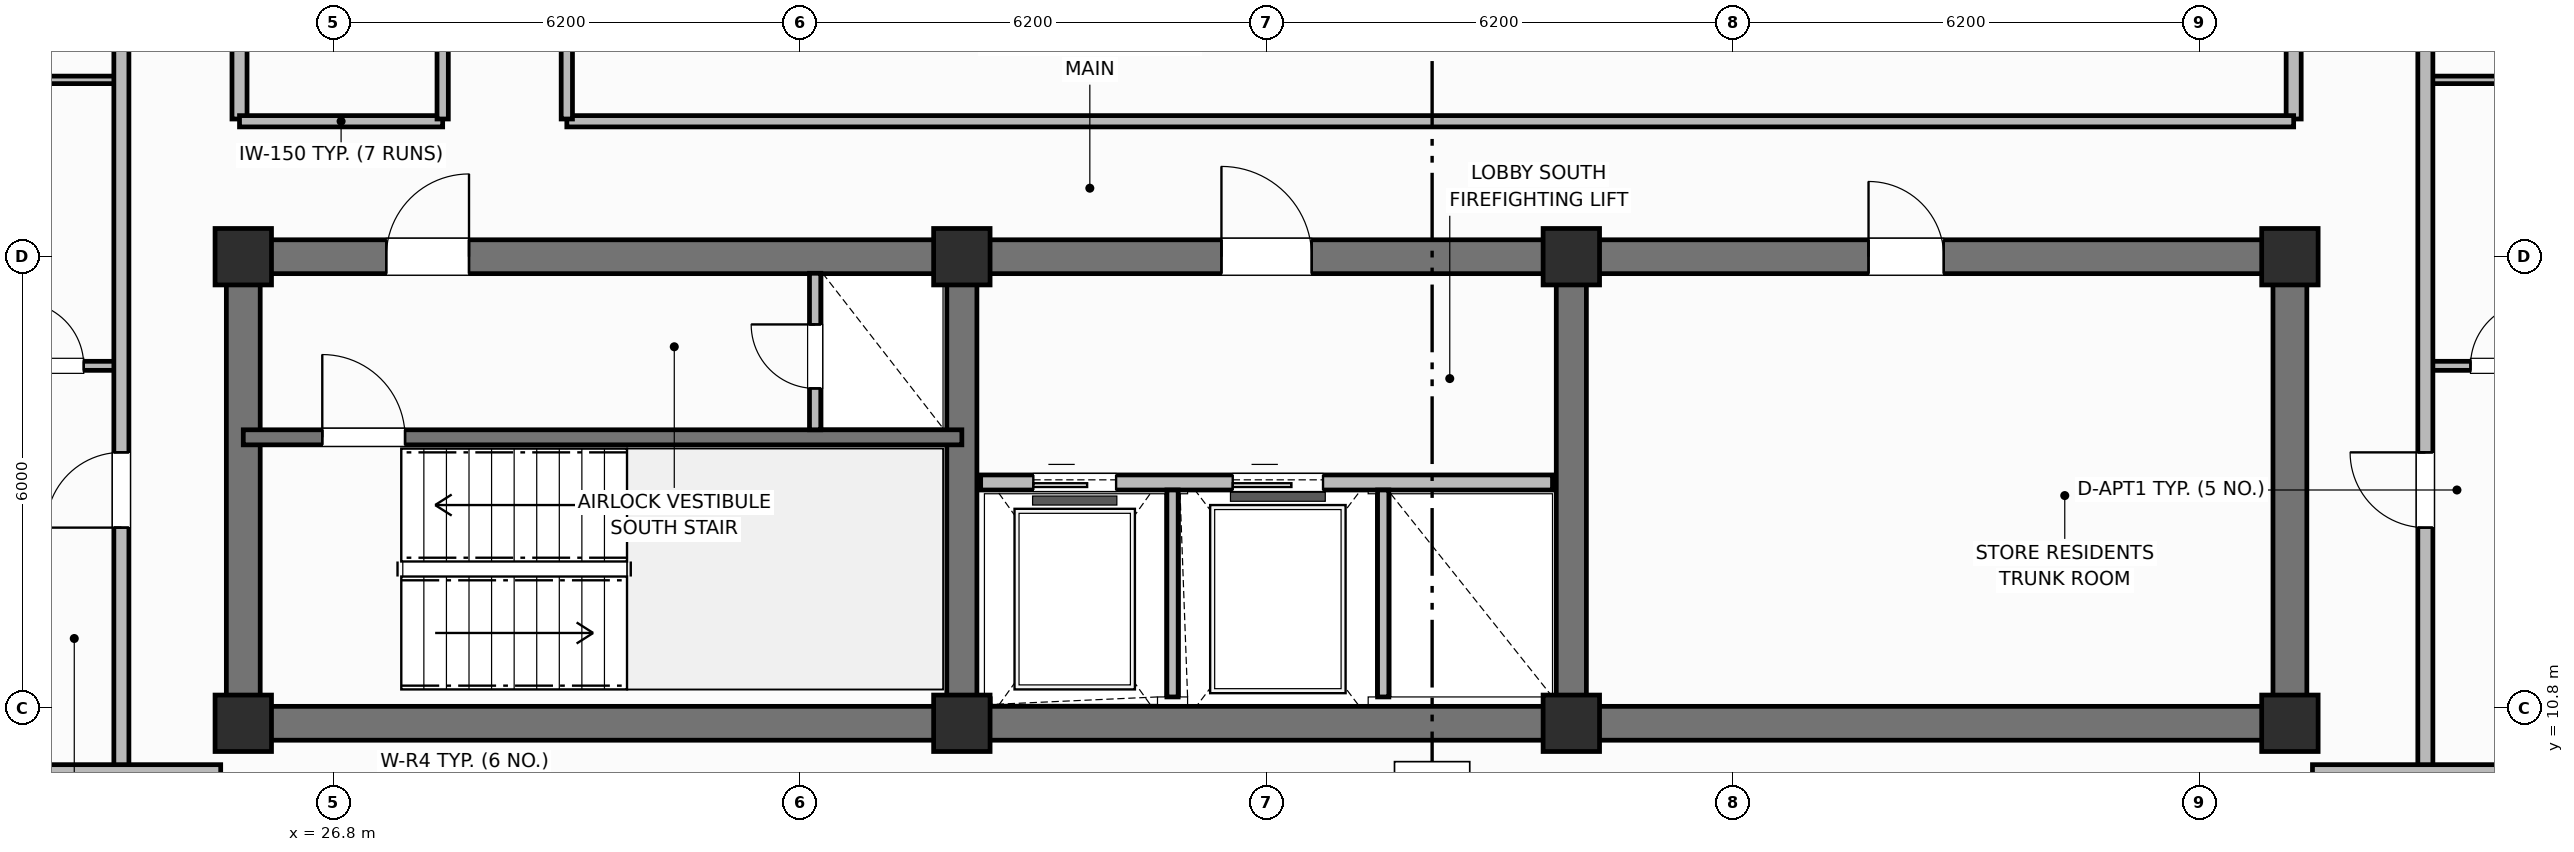
"""IFC4 building model, lengths in metres.
Left out: names, types, materials, properties, quantities, classifications, styles, units other than length and angle.
Written with IfcOpenShell. Run it as: python <this file> out.ifc"""

import sys

from ifc_helpers import new_model, si_unit, direction, frame, frame_2d, origin, origin_2d, place, context, subcontext, project, spatial, rectangle, extrude, element, fill, save


model = new_model("IFC4")
c1 = context("Model", 3, precision=1e-05, world=origin(), true_north=direction((0.0, 1.0)))
c2 = subcontext(c1, "Body", "Model", "MODEL_VIEW")
j1 = project(units=[si_unit("LENGTHUNIT", "METRE"), si_unit("PLANEANGLEUNIT", "RADIAN")], contexts=[c1])
p1 = place(None, origin())
s1 = spatial("IfcSite", under=j1, at=p1, CompositionType="ELEMENT")
p2 = place(p1, origin())
s2 = spatial("IfcBuilding", under=s1, at=p2, CompositionType="ELEMENT")
p3 = place(p2, frame((0.0, 0.0, 282.4)))
s3 = spatial("IfcBuildingStorey", under=s2, at=p3, CompositionType="ELEMENT", Elevation=282.4)
p4 = place(p3, frame((52.8, 10.6, 0.0), z_axis=(0.0, 0.0, 1.0), x_axis=(-1.0, 0.0, 0.0)))
e1 = element("IfcWall", 1, at=p4, inside=s3, PredefinedType="SHEAR", context=c2, shape_type="SweptSolid", body=[
    extrude(rectangle(XDim=27.2, YDim=0.45, at=frame_2d((13.6, 0.0))), origin(), (0.0, 0.0, 1.0), 3.7),
])
for number, where, z_axis, x_axis in (
    (2, (25.6, 10.825, 0.0), (0.0, 0.0, 1.0), (0.0, 1.0, 0.0)),
    (3, (52.8, 10.825, 0.0), (0.0, 0.0, 1.0), (0.0, 1.0, 0.0)),
):
    element("IfcWall", number, at=place(p3, frame(where, z_axis=z_axis, x_axis=x_axis)), inside=s3, PredefinedType="SHEAR", context=c2, shape_type="SweptSolid", body=[
        extrude(rectangle(XDim=5.75, YDim=0.45, at=frame_2d((2.875, 0.0))), origin(), (0.0, 0.0, 1.0), 3.7),
    ])
p5 = place(p3, frame((25.6, 16.8, 0.0), z_axis=(0.0, 0.0, 1.0), x_axis=(1.0, 0.0, 0.0)))
e4 = element("IfcWall", 4, at=p5, inside=s3, PredefinedType="SHEAR", context=c2, shape_type="SweptSolid", body=[
    extrude(rectangle(XDim=27.2, YDim=0.45, at=frame_2d((13.6, 0.0))), origin(), (0.0, 0.0, 1.0), 3.7),
])
p6 = place(p5, frame((1.9, 0.0, 0.0)))
e5 = element("IfcOpeningElement", 5, at=p6, cuts=e4, PredefinedType="OPENING", context=c2, shape_type="SweptSolid", body=[
    extrude(rectangle(XDim=1.1, YDim=2.15, at=frame_2d((0.55, 1.075))), frame((0.0, 0.235, 0.0), z_axis=(0.0, -1.0, 0.0), x_axis=(1.0, 0.0, 0.0)), (0.0, 0.0, 1.0), 0.47),
])
p7 = place(p5, frame((13.0, 0.0, 0.0)))
e6 = element("IfcOpeningElement", 6, at=p7, cuts=e4, PredefinedType="OPENING", context=c2, shape_type="SweptSolid", body=[
    extrude(rectangle(XDim=1.2, YDim=2.15, at=frame_2d((0.6, 1.075))), frame((0.0, 0.235, 0.0), z_axis=(0.0, -1.0, 0.0), x_axis=(1.0, 0.0, 0.0)), (0.0, 0.0, 1.0), 0.47),
])
p8 = place(p5, frame((21.6, 0.0, 0.0)))
e7 = element("IfcOpeningElement", 7, at=p8, cuts=e4, PredefinedType="OPENING", context=c2, shape_type="SweptSolid", body=[
    extrude(rectangle(XDim=1.0, YDim=2.15, at=frame_2d((0.5, 1.075))), frame((0.0, 0.235, 0.0), z_axis=(0.0, -1.0, 0.0), x_axis=(1.0, 0.0, 0.0)), (0.0, 0.0, 1.0), 0.47),
])
for number, where, z_axis, x_axis in (
    (8, (35.15, 10.825, 0.0), (0.0, 0.0, 1.0), (0.0, 1.0, 0.0)),
    (9, (43.25, 10.825, 0.0), (0.0, 0.0, 1.0), (0.0, 1.0, 0.0)),
):
    element("IfcWall", number, at=place(p3, frame(where, z_axis=z_axis, x_axis=x_axis)), inside=s3, PredefinedType="SHEAR", context=c2, shape_type="SweptSolid", body=[
        extrude(rectangle(XDim=5.75, YDim=0.4, at=frame_2d((2.875, 0.0))), origin(), (0.0, 0.0, 1.0), 3.7),
    ])
for number, where, z_axis, x_axis in (
    (10, (25.6, 10.6, 0.0), (0.0, 0.0, 1.0), (1.0, 0.0, 0.0)),
    (11, (25.6, 16.8, 0.0), (0.0, 0.0, 1.0), (1.0, 0.0, 0.0)),
    (12, (35.15, 10.6, 0.0), (0.0, 0.0, 1.0), (1.0, 0.0, 0.0)),
    (13, (35.15, 16.8, 0.0), (0.0, 0.0, 1.0), (1.0, 0.0, 0.0)),
    (14, (43.25, 10.6, 0.0), (0.0, 0.0, 1.0), (1.0, 0.0, 0.0)),
    (15, (43.25, 16.8, 0.0), (0.0, 0.0, 1.0), (1.0, 0.0, 0.0)),
    (16, (52.8, 10.6, 0.0), (0.0, 0.0, 1.0), (1.0, 0.0, 0.0)),
    (17, (52.8, 16.8, 0.0), (0.0, 0.0, 1.0), (1.0, 0.0, 0.0)),
):
    element("IfcColumn", number, at=place(p3, frame(where, z_axis=z_axis, x_axis=x_axis)), inside=s3, PredefinedType="COLUMN", context=c2, shape_type="SweptSolid", body=[
        extrude(rectangle(XDim=0.75, YDim=0.75, at=origin_2d()), origin(), (0.0, 0.0, 1.0), 3.7),
    ])
p9 = place(p3, frame((25.6, 14.4, 0.0), z_axis=(0.0, 0.0, 1.0), x_axis=(1.0, 0.0, 0.0)))
e18 = element("IfcWall", 18, at=p9, inside=s3, PredefinedType="SHEAR", context=c2, shape_type="SweptSolid", body=[
    extrude(rectangle(XDim=9.55, YDim=0.2, at=frame_2d((4.775, 0.0))), origin(), (0.0, 0.0, 1.0), 3.7),
])
p10 = place(p9, frame((1.05, 0.0, 0.0)))
e19 = element("IfcOpeningElement", 19, at=p10, cuts=e18, PredefinedType="OPENING", context=c2, shape_type="SweptSolid", body=[
    extrude(rectangle(XDim=1.1, YDim=2.15, at=frame_2d((0.55, 1.075))), frame((0.0, 0.11, 0.0), z_axis=(0.0, -1.0, 0.0), x_axis=(1.0, 0.0, 0.0)), (0.0, 0.0, 1.0), 0.22),
])
p11 = place(p3, frame((33.2, 14.5, 0.0), z_axis=(0.0, 0.0, 1.0), x_axis=(0.0, 1.0, 0.0)))
e20 = element("IfcWall", 20, at=p11, inside=s3, PredefinedType="PARTITIONING", context=c2, shape_type="SweptSolid", body=[
    extrude(rectangle(XDim=2.08, YDim=0.15, at=frame_2d((1.04, 0.0))), origin(), (0.0, 0.0, 1.0), 2.56),
])
p12 = place(p11, frame((0.55, 0.0, 0.0)))
e21 = element("IfcOpeningElement", 21, at=p12, cuts=e20, PredefinedType="OPENING", context=c2, shape_type="SweptSolid", body=[
    extrude(rectangle(XDim=0.85, YDim=2.05, at=frame_2d((0.425, 1.025))), frame((0.0, 0.085, 0.0), z_axis=(0.0, -1.0, 0.0), x_axis=(1.0, 0.0, 0.0)), (0.0, 0.0, 1.0), 0.17),
])
p13 = place(p3, frame((35.4, 13.8, 0.0), z_axis=(0.0, 0.0, 1.0), x_axis=(1.0, 0.0, 0.0)))
e22 = element("IfcWall", 22, at=p13, inside=s3, PredefinedType="PARTITIONING", context=c2, shape_type="SweptSolid", body=[
    extrude(rectangle(XDim=7.6, YDim=0.2, at=frame_2d((3.8, 0.0))), origin(), (0.0, 0.0, 1.0), 2.33),
])
p14 = place(p13, frame((0.7, 0.0, 0.0)))
e23 = element("IfcOpeningElement", 23, at=p14, cuts=e22, PredefinedType="OPENING", context=c2, shape_type="SweptSolid", body=[
    extrude(rectangle(XDim=1.1, YDim=2.15, at=frame_2d((0.55, 1.075))), frame((0.0, 0.11, 0.0), z_axis=(0.0, -1.0, 0.0), x_axis=(1.0, 0.0, 0.0)), (0.0, 0.0, 1.0), 0.22),
])
p15 = place(p13, frame((3.35, 0.0, 0.0)))
e24 = element("IfcOpeningElement", 24, at=p15, cuts=e22, PredefinedType="OPENING", context=c2, shape_type="SweptSolid", body=[
    extrude(rectangle(XDim=1.2, YDim=2.15, at=frame_2d((0.6, 1.075))), frame((0.0, 0.11, 0.0), z_axis=(0.0, -1.0, 0.0), x_axis=(1.0, 0.0, 0.0)), (0.0, 0.0, 1.0), 0.22),
])
for number, where, z_axis, x_axis in (
    (25, (37.95, 10.95, 0.0), (0.0, 0.0, 1.0), (0.0, 1.0, 0.0)),
    (26, (40.75, 10.95, 0.0), (0.0, 0.0, 1.0), (0.0, 1.0, 0.0)),
):
    element("IfcWall", number, at=place(p3, frame(where, z_axis=z_axis, x_axis=x_axis)), inside=s3, PredefinedType="PARTITIONING", context=c2, shape_type="SweptSolid", body=[
        extrude(rectangle(XDim=2.75, YDim=0.15, at=frame_2d((1.375, 0.0))), origin(), (0.0, 0.0, 1.0), 2.56),
    ])
for number, where, z_axis, x_axis in (
    (27, (25.55, 18.63, 0.0), (0.0, 0.0, 1.0), (0.0, 1.0, 0.0)),
    (28, (52.85, 18.63, 0.0), (0.0, 0.0, 1.0), (0.0, 1.0, 0.0)),
):
    element("IfcWall", number, at=place(p3, frame(where, z_axis=z_axis, x_axis=x_axis)), inside=s3, PredefinedType="PARTITIONING", context=c2, shape_type="SweptSolid", body=[
        extrude(rectangle(XDim=19.14, YDim=0.2, at=frame_2d((9.57, 0.0))), origin(), (0.0, 0.0, 1.0), 2.56),
    ])
p16 = place(p3, frame((25.55, 18.6, 0.0), z_axis=(0.0, 0.0, 1.0), x_axis=(1.0, 0.0, 0.0)))
e29 = element("IfcWall", 29, at=p16, inside=s3, PredefinedType="PARTITIONING", context=c2, shape_type="SweptSolid", body=[
    extrude(rectangle(XDim=2.7, YDim=0.15, at=frame_2d((1.35, 0.0))), origin(), (0.0, 0.0, 1.0), 2.56),
])
p17 = place(p3, frame((29.9, 18.6, 0.0), z_axis=(0.0, 0.0, 1.0), x_axis=(1.0, 0.0, 0.0)))
e30 = element("IfcWall", 30, at=p17, inside=s3, PredefinedType="PARTITIONING", context=c2, shape_type="SweptSolid", body=[
    extrude(rectangle(XDim=22.95, YDim=0.15, at=frame_2d((11.475, 0.0))), origin(), (0.0, 0.0, 1.0), 2.56),
])
p18 = place(p3, frame((28.25, 18.63, 0.0), z_axis=(0.0, 0.0, 1.0), x_axis=(0.0, 1.0, 0.0)))
e31 = element("IfcWall", 31, at=p18, inside=s3, PredefinedType="PARTITIONING", context=c2, shape_type="SweptSolid", body=[
    extrude(rectangle(XDim=19.14, YDim=0.15, at=frame_2d((9.57, 0.0))), origin(), (0.0, 0.0, 1.0), 2.56),
])
p19 = place(p18, frame((3.0, 0.0, 0.0)))
e32 = element("IfcOpeningElement", 32, at=p19, cuts=e31, PredefinedType="OPENING", context=c2, shape_type="SweptSolid", body=[
    extrude(rectangle(XDim=0.9, YDim=2.1, at=frame_2d((0.45, 1.05))), frame((0.0, 0.085, 0.0), z_axis=(0.0, -1.0, 0.0), x_axis=(1.0, 0.0, 0.0)), (0.0, 0.0, 1.0), 0.17),
])
p20 = place(p18, frame((11.5, 0.0, 0.0)))
e33 = element("IfcOpeningElement", 33, at=p20, cuts=e31, PredefinedType="OPENING", context=c2, shape_type="SweptSolid", body=[
    extrude(rectangle(XDim=0.9, YDim=2.1, at=frame_2d((0.45, 1.05))), frame((0.0, 0.085, 0.0), z_axis=(0.0, -1.0, 0.0), x_axis=(1.0, 0.0, 0.0)), (0.0, 0.0, 1.0), 0.17),
])
p21 = place(p3, frame((29.9, 18.63, 0.0), z_axis=(0.0, 0.0, 1.0), x_axis=(0.0, 1.0, 0.0)))
e34 = element("IfcWall", 34, at=p21, inside=s3, PredefinedType="PARTITIONING", context=c2, shape_type="SweptSolid", body=[
    extrude(rectangle(XDim=19.14, YDim=0.15, at=frame_2d((9.57, 0.0))), origin(), (0.0, 0.0, 1.0), 2.56),
])
p22 = place(p21, frame((2.4, 0.0, 0.0)))
e35 = element("IfcOpeningElement", 35, at=p22, cuts=e34, PredefinedType="OPENING", context=c2, shape_type="SweptSolid", body=[
    extrude(rectangle(XDim=1.0, YDim=2.15, at=frame_2d((0.5, 1.075))), frame((0.0, 0.085, 0.0), z_axis=(0.0, -1.0, 0.0), x_axis=(1.0, 0.0, 0.0)), (0.0, 0.0, 1.0), 0.17),
])
p23 = place(p21, frame((8.89, 0.0, 0.0)))
e36 = element("IfcOpeningElement", 36, at=p23, cuts=e34, PredefinedType="OPENING", context=c2, shape_type="SweptSolid", body=[
    extrude(rectangle(XDim=1.0, YDim=2.15, at=frame_2d((0.5, 1.075))), frame((0.0, 0.085, 0.0), z_axis=(0.0, -1.0, 0.0), x_axis=(1.0, 0.0, 0.0)), (0.0, 0.0, 1.0), 0.17),
])
p24 = place(p3, frame((22.03, 15.35, 0.0), z_axis=(0.0, 0.0, 1.0), x_axis=(1.0, 0.0, 0.0)))
e37 = element("IfcWall", 37, at=p24, inside=s3, PredefinedType="PARTITIONING", context=c2, shape_type="SweptSolid", body=[
    extrude(rectangle(XDim=1.95, YDim=0.12, at=frame_2d((0.975, 0.0))), origin(), (0.0, 0.0, 1.0), 2.56),
])
p25 = place(p24, frame((0.6, 0.0, 0.0)))
e38 = element("IfcOpeningElement", 38, at=p25, cuts=e37, PredefinedType="OPENING", context=c2, shape_type="SweptSolid", body=[
    extrude(rectangle(XDim=0.85, YDim=2.1, at=frame_2d((0.425, 1.05))), frame((0.0, 0.07, 0.0), z_axis=(0.0, -1.0, 0.0), x_axis=(1.0, 0.0, 0.0)), (0.0, 0.0, 1.0), 0.14),
])
p26 = place(p3, frame((22.03, 19.15, 0.0), z_axis=(0.0, 0.0, 1.0), x_axis=(1.0, 0.0, 0.0)))
e39 = element("IfcWall", 39, at=p26, inside=s3, PredefinedType="PARTITIONING", context=c2, shape_type="SweptSolid", body=[
    extrude(rectangle(XDim=1.95, YDim=0.1, at=frame_2d((0.975, 0.0))), origin(), (0.0, 0.0, 1.0), 2.56),
])
p27 = place(p3, frame((23.98, 9.95, 0.0), z_axis=(0.0, 0.0, 1.0), x_axis=(0.0, 1.0, 0.0)))
e40 = element("IfcWall", 40, at=p27, inside=s3, PredefinedType="PARTITIONING", context=c2, shape_type="SweptSolid", body=[
    extrude(rectangle(XDim=36.5, YDim=0.2, at=frame_2d((18.25, 0.0))), origin(), (0.0, 0.0, 1.0), 2.56),
])
p28 = place(p27, frame((3.25, 0.0, 0.0)))
e41 = element("IfcOpeningElement", 41, at=p28, cuts=e40, PredefinedType="OPENING", context=c2, shape_type="SweptSolid", body=[
    extrude(rectangle(XDim=1.0, YDim=2.15, at=frame_2d((0.5, 1.075))), frame((0.0, 0.11, 0.0), z_axis=(0.0, -1.0, 0.0), x_axis=(1.0, 0.0, 0.0)), (0.0, 0.0, 1.0), 0.22),
])
p29 = place(p27, frame((13.3, 0.0, 0.0)))
e42 = element("IfcOpeningElement", 42, at=p29, cuts=e40, PredefinedType="OPENING", context=c2, shape_type="SweptSolid", body=[
    extrude(rectangle(XDim=1.0, YDim=2.15, at=frame_2d((0.5, 1.075))), frame((0.0, 0.11, 0.0), z_axis=(0.0, -1.0, 0.0), x_axis=(1.0, 0.0, 0.0)), (0.0, 0.0, 1.0), 0.22),
])
p30 = place(p27, frame((25.005, 0.0, 0.0)))
e43 = element("IfcOpeningElement", 43, at=p30, cuts=e40, PredefinedType="OPENING", context=c2, shape_type="SweptSolid", body=[
    extrude(rectangle(XDim=1.0, YDim=2.15, at=frame_2d((0.5, 1.075))), frame((0.0, 0.11, 0.0), z_axis=(0.0, -1.0, 0.0), x_axis=(1.0, 0.0, 0.0)), (0.0, 0.0, 1.0), 0.22),
])
p31 = place(p3, frame((21.546, 9.95, 0.0), z_axis=(0.0, 0.0, 1.0), x_axis=(1.0, 0.0, 0.0)))
e44 = element("IfcWall", 44, at=p31, inside=s3, PredefinedType="PARTITIONING", context=c2, shape_type="SweptSolid", body=[
    extrude(rectangle(XDim=3.754, YDim=0.2, at=frame_2d((1.877, 0.0))), origin(), (0.0, 0.0, 1.0), 2.56),
])
p32 = place(p3, frame((54.6, 15.35, 0.0), z_axis=(0.0, 0.0, 1.0), x_axis=(1.0, 0.0, 0.0)))
e45 = element("IfcWall", 45, at=p32, inside=s3, PredefinedType="PARTITIONING", context=c2, shape_type="SweptSolid", body=[
    extrude(rectangle(XDim=1.95, YDim=0.12, at=frame_2d((0.975, 0.0))), origin(), (0.0, 0.0, 1.0), 2.56),
])
p33 = place(p32, frame((0.6, 0.0, 0.0)))
e46 = element("IfcOpeningElement", 46, at=p33, cuts=e45, PredefinedType="OPENING", context=c2, shape_type="SweptSolid", body=[
    extrude(rectangle(XDim=0.85, YDim=2.1, at=frame_2d((0.425, 1.05))), frame((0.0, 0.07, 0.0), z_axis=(0.0, -1.0, 0.0), x_axis=(1.0, 0.0, 0.0)), (0.0, 0.0, 1.0), 0.14),
])
p34 = place(p3, frame((54.6, 19.15, 0.0), z_axis=(0.0, 0.0, 1.0), x_axis=(1.0, 0.0, 0.0)))
e47 = element("IfcWall", 47, at=p34, inside=s3, PredefinedType="PARTITIONING", context=c2, shape_type="SweptSolid", body=[
    extrude(rectangle(XDim=1.95, YDim=0.1, at=frame_2d((0.975, 0.0))), origin(), (0.0, 0.0, 1.0), 2.56),
])
p35 = place(p3, frame((54.6, 9.95, 0.0), z_axis=(0.0, 0.0, 1.0), x_axis=(0.0, 1.0, 0.0)))
e48 = element("IfcWall", 48, at=p35, inside=s3, PredefinedType="PARTITIONING", context=c2, shape_type="SweptSolid", body=[
    extrude(rectangle(XDim=36.5, YDim=0.2, at=frame_2d((18.25, 0.0))), origin(), (0.0, 0.0, 1.0), 2.56),
])
p36 = place(p35, frame((3.25, 0.0, 0.0)))
e49 = element("IfcOpeningElement", 49, at=p36, cuts=e48, PredefinedType="OPENING", context=c2, shape_type="SweptSolid", body=[
    extrude(rectangle(XDim=1.0, YDim=2.15, at=frame_2d((0.5, 1.075))), frame((0.0, 0.11, 0.0), z_axis=(0.0, -1.0, 0.0), x_axis=(1.0, 0.0, 0.0)), (0.0, 0.0, 1.0), 0.22),
])
p37 = place(p35, frame((23.5, 0.0, 0.0)))
e50 = element("IfcOpeningElement", 50, at=p37, cuts=e48, PredefinedType="OPENING", context=c2, shape_type="SweptSolid", body=[
    extrude(rectangle(XDim=1.0, YDim=2.15, at=frame_2d((0.5, 1.075))), frame((0.0, 0.11, 0.0), z_axis=(0.0, -1.0, 0.0), x_axis=(1.0, 0.0, 0.0)), (0.0, 0.0, 1.0), 0.22),
])
p38 = place(p3, frame((53.1, 9.95, 0.0), z_axis=(0.0, 0.0, 1.0), x_axis=(1.0, 0.0, 0.0)))
e51 = element("IfcWall", 51, at=p38, inside=s3, PredefinedType="PARTITIONING", context=c2, shape_type="SweptSolid", body=[
    extrude(rectangle(XDim=3.754, YDim=0.2, at=frame_2d((1.877, 0.0))), origin(), (0.0, 0.0, 1.0), 2.56),
])
p39 = place(p10, origin())
e52 = element("IfcDoor", 52, at=p39, inside=s3, OperationType="SINGLE_SWING_LEFT", PredefinedType="DOOR", context=c2, shape_type="SweptSolid", body=[
    extrude(rectangle(XDim=1.1, YDim=2.15, at=frame_2d((0.55, 1.075))), frame((0.0, 0.025, 0.0), z_axis=(0.0, -1.0, 0.0), x_axis=(1.0, 0.0, 0.0)), (0.0, 0.0, 1.0), 0.05),
])
fill(e19, e52)
p40 = place(p12, origin())
e53 = element("IfcDoor", 53, at=p40, inside=s3, OperationType="SINGLE_SWING_RIGHT", PredefinedType="TRAPDOOR", context=c2, shape_type="SweptSolid", body=[
    extrude(rectangle(XDim=0.85, YDim=2.05, at=frame_2d((0.425, 1.025))), frame((0.0, 0.025, 0.0), z_axis=(0.0, -1.0, 0.0), x_axis=(1.0, 0.0, 0.0)), (0.0, 0.0, 1.0), 0.05),
])
fill(e21, e53)
p41 = place(p14, origin())
e54 = element("IfcDoor", 54, at=p41, inside=s3, OperationType="SLIDING_TO_LEFT", PredefinedType="DOOR", context=c2, shape_type="SweptSolid", body=[
    extrude(rectangle(XDim=1.1, YDim=2.15, at=frame_2d((0.55, 1.075))), frame((0.0, 0.025, 0.0), z_axis=(0.0, -1.0, 0.0), x_axis=(1.0, 0.0, 0.0)), (0.0, 0.0, 1.0), 0.05),
])
fill(e23, e54)
p42 = place(p15, origin())
e55 = element("IfcDoor", 55, at=p42, inside=s3, OperationType="SLIDING_TO_LEFT", PredefinedType="DOOR", context=c2, shape_type="SweptSolid", body=[
    extrude(rectangle(XDim=1.2, YDim=2.15, at=frame_2d((0.6, 1.075))), frame((0.0, 0.025, 0.0), z_axis=(0.0, -1.0, 0.0), x_axis=(1.0, 0.0, 0.0)), (0.0, 0.0, 1.0), 0.05),
])
fill(e24, e55)
p43 = place(p25, origin())
e56 = element("IfcDoor", 56, at=p43, inside=s3, OperationType="SINGLE_SWING_LEFT", PredefinedType="DOOR", context=c2, shape_type="SweptSolid", body=[
    extrude(rectangle(XDim=0.85, YDim=2.1, at=frame_2d((0.425, 1.05))), frame((0.0, 0.025, 0.0), z_axis=(0.0, -1.0, 0.0), x_axis=(1.0, 0.0, 0.0)), (0.0, 0.0, 1.0), 0.05),
])
fill(e38, e56)
p44 = place(p28, origin())
e57 = element("IfcDoor", 57, at=p44, inside=s3, OperationType="SINGLE_SWING_LEFT", PredefinedType="DOOR", context=c2, shape_type="SweptSolid", body=[
    extrude(rectangle(XDim=1.0, YDim=2.15, at=frame_2d((0.5, 1.075))), frame((0.0, 0.025, 0.0), z_axis=(0.0, -1.0, 0.0), x_axis=(1.0, 0.0, 0.0)), (0.0, 0.0, 1.0), 0.05),
])
fill(e41, e57)
p45 = place(p33, origin())
e58 = element("IfcDoor", 58, at=p45, inside=s3, OperationType="SINGLE_SWING_RIGHT", PredefinedType="DOOR", context=c2, shape_type="SweptSolid", body=[
    extrude(rectangle(XDim=0.85, YDim=2.1, at=frame_2d((0.425, 1.05))), frame((0.0, 0.025, 0.0), z_axis=(0.0, -1.0, 0.0), x_axis=(1.0, 0.0, 0.0)), (0.0, 0.0, 1.0), 0.05),
])
fill(e46, e58)
p46 = place(p36, origin())
e59 = element("IfcDoor", 59, at=p46, inside=s3, OperationType="SINGLE_SWING_RIGHT", PredefinedType="DOOR", context=c2, shape_type="SweptSolid", body=[
    extrude(rectangle(XDim=1.0, YDim=2.15, at=frame_2d((0.5, 1.075))), frame((0.0, 0.025, 0.0), z_axis=(0.0, -1.0, 0.0), x_axis=(1.0, 0.0, 0.0)), (0.0, 0.0, 1.0), 0.05),
])
fill(e49, e59)
p47 = place(p6, origin())
e60 = element("IfcDoor", 60, at=p47, inside=s3, OperationType="SINGLE_SWING_RIGHT", PredefinedType="DOOR", context=c2, shape_type="SweptSolid", body=[
    extrude(rectangle(XDim=1.1, YDim=2.15, at=frame_2d((0.55, 1.075))), frame((0.0, 0.025, 0.0), z_axis=(0.0, -1.0, 0.0), x_axis=(1.0, 0.0, 0.0)), (0.0, 0.0, 1.0), 0.05),
])
fill(e5, e60)
p48 = place(p7, origin())
e61 = element("IfcDoor", 61, at=p48, inside=s3, OperationType="SINGLE_SWING_LEFT", PredefinedType="DOOR", context=c2, shape_type="SweptSolid", body=[
    extrude(rectangle(XDim=1.2, YDim=2.15, at=frame_2d((0.6, 1.075))), frame((0.0, 0.025, 0.0), z_axis=(0.0, -1.0, 0.0), x_axis=(1.0, 0.0, 0.0)), (0.0, 0.0, 1.0), 0.05),
])
fill(e6, e61)
p49 = place(p8, origin())
e62 = element("IfcDoor", 62, at=p49, inside=s3, OperationType="SINGLE_SWING_LEFT", PredefinedType="DOOR", context=c2, shape_type="SweptSolid", body=[
    extrude(rectangle(XDim=1.0, YDim=2.15, at=frame_2d((0.5, 1.075))), frame((0.0, 0.025, 0.0), z_axis=(0.0, -1.0, 0.0), x_axis=(1.0, 0.0, 0.0)), (0.0, 0.0, 1.0), 0.05),
])
fill(e7, e62)
save(model, sys.argv[1])
